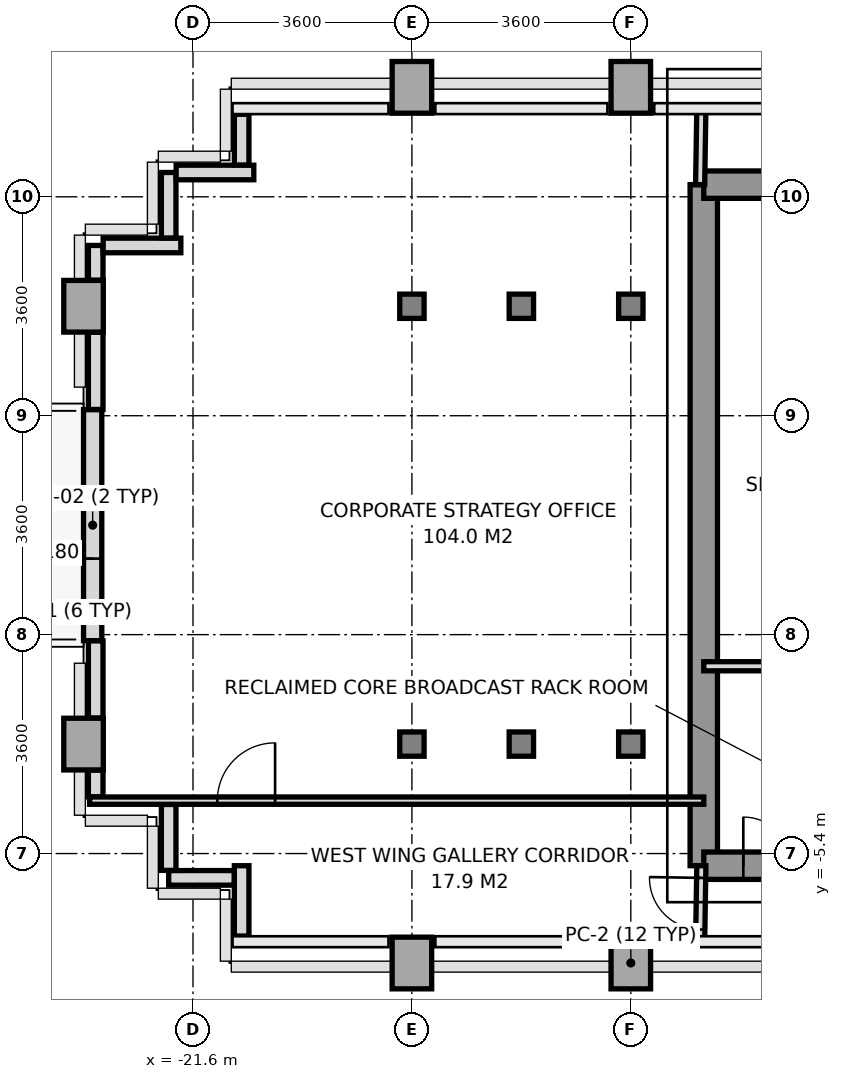
"""IFC4 building model, lengths in metres.
Left out: names, types, materials, properties, quantities, classifications, styles, units other than length and angle.
Written with IfcOpenShell. Run it as: python <this file> out.ifc"""

import sys

from ifc_helpers import new_model, si_unit, direction, frame, frame_2d, origin, origin_2d, place, context, subcontext, project, spatial, rectangle, i_section, extrude, source, transform, mapped, element, fill, save


model = new_model("IFC4")
c1 = context("Model", 3, precision=1e-05, world=origin(), true_north=direction((0.0, 1.0)))
c2 = subcontext(c1, "Body", "Model", "MODEL_VIEW")
j1 = project(units=[si_unit("LENGTHUNIT", "METRE"), si_unit("PLANEANGLEUNIT", "RADIAN")], contexts=[c1])
p1 = place(None, origin())
s1 = spatial("IfcSite", under=j1, at=p1, CompositionType="ELEMENT")
p2 = place(p1, origin())
s2 = spatial("IfcBuilding", under=s1, at=p2, CompositionType="ELEMENT")
p3 = place(p2, frame((0.0, 0.0, 104.0)))
s3 = spatial("IfcBuildingStorey", under=s2, at=p3, CompositionType="ELEMENT", Elevation=104.0)
m1 = source(origin(), c2, "Body", "SweptSolid", [
    extrude(rectangle(XDim=0.65, YDim=0.85, at=origin_2d()), origin(), (0.0, 0.0, 1.0), 3.2),
])
for number, where, z_axis, x_axis in (
    (1, (-23.4, -3.6, 0.0), (0.0, 0.0, 1.0), (1.0, 0.0, 0.0)),
    (2, (-23.4, 3.6, 0.0), (0.0, 0.0, 1.0), (1.0, 0.0, 0.0)),
    (3, (-18.0, -7.2, 0.0), (0.0, 0.0, 1.0), (1.0, 0.0, 0.0)),
):
    element("IfcColumn", number, at=place(p3, frame(where, z_axis=z_axis, x_axis=x_axis)), inside=s3, PredefinedType="COLUMN", context=c2, shape_type="MappedRepresentation", body=[
        mapped(m1, transform((0.0, 0.0, 0.0), x_axis=(1.0, 0.0, 0.0), y_axis=(0.0, 1.0, 0.0), z_axis=(0.0, 0.0, 1.0), scale=1.0)),
    ])
m2 = source(origin(), c2, "Body", "SweptSolid", [
    extrude(i_section(OverallWidth=0.401, OverallDepth=0.399, WebThickness=0.02, FlangeThickness=0.032, at=origin_2d()), origin(), (0.0, 0.0, 1.0), 3.2),
])
for number, where, z_axis, x_axis in (
    (4, (-18.0, -3.6, 0.0), (0.0, 0.0, 1.0), (1.0, 0.0, 0.0)),
    (5, (-18.0, 3.6, 0.0), (0.0, 0.0, 1.0), (1.0, 0.0, 0.0)),
):
    element("IfcColumn", number, at=place(p3, frame(where, z_axis=z_axis, x_axis=x_axis)), inside=s3, PredefinedType="COLUMN", context=c2, shape_type="MappedRepresentation", body=[
        mapped(m2, transform((0.0, 0.0, 0.0), x_axis=(1.0, 0.0, 0.0), y_axis=(0.0, 1.0, 0.0), z_axis=(0.0, 0.0, 1.0), scale=1.0)),
    ])
p4 = place(p3, frame((-18.0, 7.2, 0.0), z_axis=(0.0, 0.0, 1.0), x_axis=(1.0, 0.0, 0.0)))
e6 = element("IfcColumn", 6, at=p4, inside=s3, PredefinedType="COLUMN", context=c2, shape_type="MappedRepresentation", body=[
    mapped(m1, transform((0.0, 0.0, 0.0), x_axis=(1.0, 0.0, 0.0), y_axis=(0.0, 1.0, 0.0), z_axis=(0.0, 0.0, 1.0), scale=1.0)),
])
for number, where, z_axis, x_axis in (
    (7, (-16.2, -3.6, 0.0), (0.0, 0.0, 1.0), (1.0, 0.0, 0.0)),
    (8, (-16.2, 3.6, 0.0), (0.0, 0.0, 1.0), (1.0, 0.0, 0.0)),
):
    element("IfcColumn", number, at=place(p3, frame(where, z_axis=z_axis, x_axis=x_axis)), inside=s3, PredefinedType="COLUMN", context=c2, shape_type="MappedRepresentation", body=[
        mapped(m2, transform((0.0, 0.0, 0.0), x_axis=(1.0, 0.0, 0.0), y_axis=(0.0, 1.0, 0.0), z_axis=(0.0, 0.0, 1.0), scale=1.0)),
    ])
p5 = place(p3, frame((-14.4, -7.2, 0.0), z_axis=(0.0, 0.0, 1.0), x_axis=(1.0, 0.0, 0.0)))
e9 = element("IfcColumn", 9, at=p5, inside=s3, PredefinedType="COLUMN", context=c2, shape_type="MappedRepresentation", body=[
    mapped(m1, transform((0.0, 0.0, 0.0), x_axis=(1.0, 0.0, 0.0), y_axis=(0.0, 1.0, 0.0), z_axis=(0.0, 0.0, 1.0), scale=1.0)),
])
for number, where, z_axis, x_axis in (
    (10, (-14.4, -3.6, 0.0), (0.0, 0.0, 1.0), (1.0, 0.0, 0.0)),
    (11, (-14.4, 3.6, 0.0), (0.0, 0.0, 1.0), (1.0, 0.0, 0.0)),
):
    element("IfcColumn", number, at=place(p3, frame(where, z_axis=z_axis, x_axis=x_axis)), inside=s3, PredefinedType="COLUMN", context=c2, shape_type="MappedRepresentation", body=[
        mapped(m2, transform((0.0, 0.0, 0.0), x_axis=(1.0, 0.0, 0.0), y_axis=(0.0, 1.0, 0.0), z_axis=(0.0, 0.0, 1.0), scale=1.0)),
    ])
p6 = place(p3, frame((-14.4, 7.2, 0.0), z_axis=(0.0, 0.0, 1.0), x_axis=(1.0, 0.0, 0.0)))
e12 = element("IfcColumn", 12, at=p6, inside=s3, PredefinedType="COLUMN", context=c2, shape_type="MappedRepresentation", body=[
    mapped(m1, transform((0.0, 0.0, 0.0), x_axis=(1.0, 0.0, 0.0), y_axis=(0.0, 1.0, 0.0), z_axis=(0.0, 0.0, 1.0), scale=1.0)),
])
p7 = place(p3, frame((-23.25, -1.9, 0.0), z_axis=(0.0, 0.0, 1.0), x_axis=(0.0, 1.0, 0.0)))
e13 = element("IfcWall", 13, at=p7, inside=s3, PredefinedType="SOLIDWALL", context=c2, shape_type="SweptSolid", body=[
    extrude(rectangle(XDim=3.8, YDim=0.3, at=frame_2d((1.9, 0.0))), origin(), (0.0, 0.0, 1.0), 2.45),
])
p8 = place(p7, frame((1.35, 0.0, 0.0)))
e14 = element("IfcOpeningElement", 14, at=p8, cuts=e13, PredefinedType="OPENING", context=c2, shape_type="SweptSolid", body=[
    extrude(rectangle(XDim=1.1, YDim=2.3, at=frame_2d((0.55, 1.15))), frame((0.0, 0.16, 0.0), z_axis=(0.0, -1.0, 0.0), x_axis=(1.0, 0.0, 0.0)), (0.0, 0.0, 1.0), 0.32),
])
p9 = place(p3, frame((-20.8, -6.757, 0.0), z_axis=(0.0, 0.0, 1.0), x_axis=(0.0, 1.0, 0.0)))
e15 = element("IfcWall", 15, at=p9, inside=s3, PredefinedType="PARAPET", context=c2, shape_type="SweptSolid", body=[
    extrude(rectangle(XDim=1.157, YDim=0.24, at=frame_2d((0.579, 0.0))), origin(), (0.0, 0.0, 1.0), 1.15),
])
p10 = place(p3, frame((-20.923, -5.8, 0.0), z_axis=(0.0, 0.0, 1.0), x_axis=(-1.0, 0.0, 0.0)))
e16 = element("IfcWall", 16, at=p10, inside=s3, PredefinedType="PARAPET", context=c2, shape_type="SweptSolid", body=[
    extrude(rectangle(XDim=1.077, YDim=0.24, at=frame_2d((0.539, 0.0))), origin(), (0.0, 0.0, 1.0), 1.15),
])
p11 = place(p3, frame((-22.0, -5.677, 0.0), z_axis=(0.0, 0.0, 1.0), x_axis=(0.0, 1.0, 0.0)))
e17 = element("IfcWall", 17, at=p11, inside=s3, PredefinedType="PARAPET", context=c2, shape_type="SweptSolid", body=[
    extrude(rectangle(XDim=1.084, YDim=0.24, at=frame_2d((0.542, 0.0))), origin(), (0.0, 0.0, 1.0), 1.15),
])
p12 = place(p3, frame((-23.2, -4.467, 0.0), z_axis=(0.0, 0.0, 1.0), x_axis=(0.0, 1.0, 0.0)))
e18 = element("IfcWall", 18, at=p12, inside=s3, PredefinedType="PARAPET", context=c2, shape_type="SweptSolid", body=[
    extrude(rectangle(XDim=0.439, YDim=0.24, at=frame_2d((0.219, 0.0))), origin(), (0.0, 0.0, 1.0), 1.15),
])
for number, where, z_axis, x_axis in (
    (19, (-23.2, -3.172, 0.0), (0.0, 0.0, 1.0), (0.0, 1.0, 0.0)),
    (20, (-23.2, 1.903, 0.0), (0.0, 0.0, 1.0), (0.0, 1.0, 0.0)),
):
    element("IfcWall", number, at=place(p3, frame(where, z_axis=z_axis, x_axis=x_axis)), inside=s3, PredefinedType="PARAPET", context=c2, shape_type="SweptSolid", body=[
        extrude(rectangle(XDim=1.269, YDim=0.24, at=frame_2d((0.635, 0.0))), origin(), (0.0, 0.0, 1.0), 1.15),
    ])
p13 = place(p3, frame((-23.2, 4.028, 0.0), z_axis=(0.0, 0.0, 1.0), x_axis=(0.0, 1.0, 0.0)))
e21 = element("IfcWall", 21, at=p13, inside=s3, PredefinedType="PARAPET", context=c2, shape_type="SweptSolid", body=[
    extrude(rectangle(XDim=0.572, YDim=0.24, at=frame_2d((0.286, 0.0))), origin(), (0.0, 0.0, 1.0), 1.15),
])
p14 = place(p3, frame((-23.077, 4.6, 0.0), z_axis=(0.0, 0.0, 1.0), x_axis=(1.0, 0.0, 0.0)))
e22 = element("IfcWall", 22, at=p14, inside=s3, PredefinedType="PARAPET", context=c2, shape_type="SweptSolid", body=[
    extrude(rectangle(XDim=1.277, YDim=0.24, at=frame_2d((0.638, 0.0))), origin(), (0.0, 0.0, 1.0), 1.15),
])
p15 = place(p3, frame((-22.0, 4.723, 0.0), z_axis=(0.0, 0.0, 1.0), x_axis=(0.0, 1.0, 0.0)))
e23 = element("IfcWall", 23, at=p15, inside=s3, PredefinedType="PARAPET", context=c2, shape_type="SweptSolid", body=[
    extrude(rectangle(XDim=1.077, YDim=0.24, at=frame_2d((0.539, 0.0))), origin(), (0.0, 0.0, 1.0), 1.15),
])
p16 = place(p3, frame((-21.877, 5.8, 0.0), z_axis=(0.0, 0.0, 1.0), x_axis=(1.0, 0.0, 0.0)))
e24 = element("IfcWall", 24, at=p16, inside=s3, PredefinedType="PARAPET", context=c2, shape_type="SweptSolid", body=[
    extrude(rectangle(XDim=1.277, YDim=0.24, at=frame_2d((0.638, 0.0))), origin(), (0.0, 0.0, 1.0), 1.15),
])
p17 = place(p3, frame((-20.8, 5.923, 0.0), z_axis=(0.0, 0.0, 1.0), x_axis=(0.0, 1.0, 0.0)))
e25 = element("IfcWall", 25, at=p17, inside=s3, PredefinedType="PARAPET", context=c2, shape_type="SweptSolid", body=[
    extrude(rectangle(XDim=0.834, YDim=0.24, at=frame_2d((0.417, 0.0))), origin(), (0.0, 0.0, 1.0), 1.15),
])
p18 = place(p3, frame((-13.2, -5.6, 0.0), z_axis=(0.0, 0.0, 1.0), x_axis=(0.0, 1.0, 0.0)))
e26 = element("IfcWall", 26, at=p18, inside=s3, PredefinedType="SHEAR", context=c2, shape_type="SweptSolid", body=[
    extrude(rectangle(XDim=11.2, YDim=0.45, at=frame_2d((5.6, 0.0))), origin(), (0.0, 0.0, 1.0), 3.2),
])
p19 = place(p3, frame((-13.2, 5.6, 0.0), z_axis=(0.0, 0.0, 1.0), x_axis=(1.0, 0.0, 0.0)))
e27 = element("IfcWall", 27, at=p19, inside=s3, PredefinedType="SHEAR", context=c2, shape_type="SweptSolid", body=[
    extrude(rectangle(XDim=1.819, YDim=0.45, at=frame_2d((0.909, 0.0))), origin(), (0.0, 0.0, 1.0), 3.2),
])
p20 = place(p3, frame((-13.2, -5.6, 0.0), z_axis=(0.0, 0.0, 1.0), x_axis=(1.0, 0.0, 0.0)))
e28 = element("IfcWall", 28, at=p20, inside=s3, PredefinedType="SHEAR", context=c2, shape_type="SweptSolid", body=[
    extrude(rectangle(XDim=7.8, YDim=0.45, at=frame_2d((3.9, 0.0))), origin(), (0.0, 0.0, 1.0), 3.2),
])
p21 = place(p20, frame((3.6, 0.0, 0.0)))
e29 = element("IfcOpeningElement", 29, at=p21, cuts=e28, PredefinedType="OPENING", context=c2, shape_type="SweptSolid", body=[
    extrude(rectangle(XDim=1.2, YDim=2.2, at=frame_2d((0.6, 1.1))), frame((0.0, 0.235, 0.0), z_axis=(0.0, -1.0, 0.0), x_axis=(1.0, 0.0, 0.0)), (0.0, 0.0, 1.0), 0.47),
])
p22 = place(p20, frame((0.65, 0.0, 0.0)))
e30 = element("IfcOpeningElement", 30, at=p22, cuts=e28, PredefinedType="OPENING", context=c2, shape_type="SweptSolid", body=[
    extrude(rectangle(XDim=0.8, YDim=2.1, at=frame_2d((0.4, 1.05))), frame((0.0, 0.235, 0.0), z_axis=(0.0, -1.0, 0.0), x_axis=(1.0, 0.0, 0.0)), (0.0, 0.0, 1.0), 0.47),
])
p23 = place(p3, frame((-13.2, -2.32, 0.0), z_axis=(0.0, 0.0, 1.0), x_axis=(1.0, 0.0, 0.0)))
e31 = element("IfcWall", 31, at=p23, inside=s3, PredefinedType="PARTITIONING", context=c2, shape_type="SweptSolid", body=[
    extrude(rectangle(XDim=2.18, YDim=0.15, at=frame_2d((1.09, 0.0))), origin(), (0.0, 0.0, 1.0), 3.2),
])
p24 = place(p3, frame((-13.26, 5.6, 0.0), z_axis=(0.0, 0.0, 1.0), x_axis=(0.016013571389, 0.999871774545, 0.0)))
e32 = element("IfcWall", 32, at=p24, inside=s3, PredefinedType="PARTITIONING", context=c2, shape_type="SweptSolid", body=[
    extrude(rectangle(XDim=1.25, YDim=0.15, at=frame_2d((0.625, 0.0))), origin(), (0.0, 0.0, 1.0), 3.2),
])
p25 = place(p3, frame((-13.26, -6.85, 0.0), z_axis=(0.0, 0.0, 1.0), x_axis=(0.016013571389, 0.999871774545, 0.0)))
e33 = element("IfcWall", 33, at=p25, inside=s3, PredefinedType="PARTITIONING", context=c2, shape_type="SweptSolid", body=[
    extrude(rectangle(XDim=1.25, YDim=0.15, at=frame_2d((0.625, 0.0))), origin(), (0.0, 0.0, 1.0), 3.2),
])
p26 = place(p25, frame((0.2, 0.0, 0.0)))
e34 = element("IfcOpeningElement", 34, at=p26, cuts=e33, PredefinedType="OPENING", context=c2, shape_type="SweptSolid", body=[
    extrude(rectangle(XDim=0.85, YDim=2.1, at=frame_2d((0.425, 1.05))), frame((0.0, 0.085, 0.0), z_axis=(0.0, -1.0, 0.0), x_axis=(1.0, 0.0, 0.0)), (0.0, 0.0, 1.0), 0.17),
])
p27 = place(p3, frame((-23.3, -4.53, 0.0), z_axis=(0.0, 0.0, 1.0), x_axis=(1.0, 0.0, 0.0)))
e35 = element("IfcWall", 35, at=p27, inside=s3, PredefinedType="PARTITIONING", context=c2, shape_type="SweptSolid", body=[
    extrude(rectangle(XDim=10.1, YDim=0.12, at=frame_2d((5.05, 0.0))), origin(), (0.0, 0.0, 1.0), 2.76),
])
p28 = place(p27, frame((2.1, 0.0, 0.0)))
e36 = element("IfcOpeningElement", 36, at=p28, cuts=e35, PredefinedType="OPENING", context=c2, shape_type="SweptSolid", body=[
    extrude(rectangle(XDim=0.95, YDim=2.15, at=frame_2d((0.475, 1.075))), frame((0.0, 0.07, 0.0), z_axis=(0.0, -1.0, 0.0), x_axis=(1.0, 0.0, 0.0)), (0.0, 0.0, 1.0), 0.14),
])
m3 = source(origin(), c2, "Body", "SweptSolid", [
    extrude(rectangle(XDim=1.1, YDim=2.3, at=frame_2d((0.55, 1.15))), frame((0.0, 0.025, 0.0), z_axis=(0.0, -1.0, 0.0), x_axis=(1.0, 0.0, 0.0)), (0.0, 0.0, 1.0), 0.05),
])
p29 = place(p8, origin())
e37 = element("IfcDoor", 37, at=p29, inside=s3, OperationType="SINGLE_SWING_LEFT", PredefinedType="DOOR", context=c2, shape_type="MappedRepresentation", body=[
    mapped(m3, transform((0.0, 0.0, 0.0), x_axis=(1.0, 0.0, 0.0), y_axis=(0.0, 1.0, 0.0), z_axis=(0.0, 0.0, 1.0), scale=1.0)),
])
fill(e14, e37)
m4 = source(origin(), c2, "Body", "SweptSolid", [
    extrude(rectangle(XDim=0.8, YDim=2.1, at=frame_2d((0.4, 1.05))), frame((0.0, 0.025, 0.0), z_axis=(0.0, -1.0, 0.0), x_axis=(1.0, 0.0, 0.0)), (0.0, 0.0, 1.0), 0.05),
])
p30 = place(p22, origin())
e38 = element("IfcDoor", 38, at=p30, inside=s3, OperationType="SINGLE_SWING_LEFT", PredefinedType="DOOR", context=c2, shape_type="MappedRepresentation", body=[
    mapped(m4, transform((0.0, 0.0, 0.0), x_axis=(1.0, 0.0, 0.0), y_axis=(0.0, 1.0, 0.0), z_axis=(0.0, 0.0, 1.0), scale=1.0)),
])
fill(e30, e38)
m5 = source(origin(), c2, "Body", "SweptSolid", [
    extrude(rectangle(XDim=0.85, YDim=2.1, at=frame_2d((0.425, 1.05))), frame((0.0, 0.025, 0.0), z_axis=(0.0, -1.0, 0.0), x_axis=(1.0, 0.0, 0.0)), (0.0, 0.0, 1.0), 0.05),
])
p31 = place(p26, origin())
e39 = element("IfcDoor", 39, at=p31, inside=s3, OperationType="SINGLE_SWING_RIGHT", PredefinedType="DOOR", context=c2, shape_type="MappedRepresentation", body=[
    mapped(m5, transform((0.0, 0.0, 0.0), x_axis=(1.0, 0.0, 0.0), y_axis=(0.0, 1.0, 0.0), z_axis=(0.0, 0.0, 1.0), scale=1.0)),
])
fill(e34, e39)
m6 = source(origin(), c2, "Body", "SweptSolid", [
    extrude(rectangle(XDim=0.95, YDim=2.15, at=frame_2d((0.475, 1.075))), frame((0.0, 0.025, 0.0), z_axis=(0.0, -1.0, 0.0), x_axis=(1.0, 0.0, 0.0)), (0.0, 0.0, 1.0), 0.05),
])
p32 = place(p28, origin())
e40 = element("IfcDoor", 40, at=p32, inside=s3, OperationType="SINGLE_SWING_RIGHT", PredefinedType="DOOR", context=c2, shape_type="MappedRepresentation", body=[
    mapped(m6, transform((0.0, 0.0, 0.0), x_axis=(1.0, 0.0, 0.0), y_axis=(0.0, 1.0, 0.0), z_axis=(0.0, 0.0, 1.0), scale=1.0)),
])
fill(e36, e40)
save(model, sys.argv[1])
